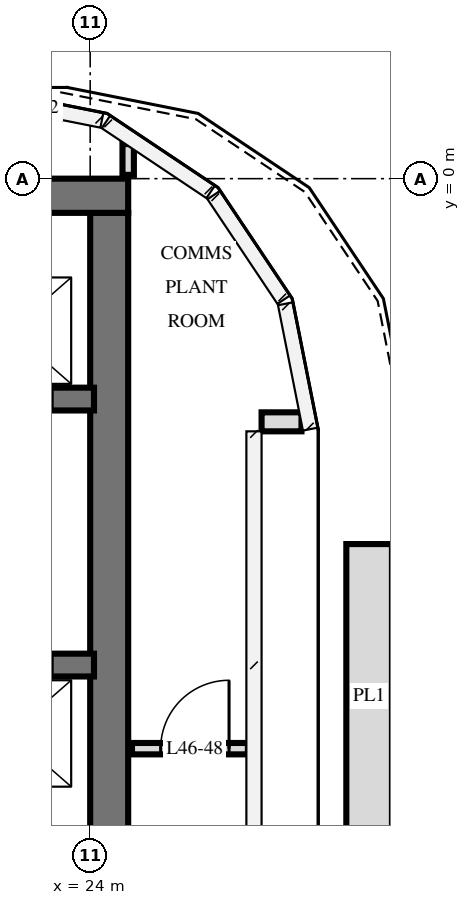
"""IFC4 building model, lengths in metres.
Left out: names, types, materials, properties, quantities, classifications, styles, units other than length and angle.
Written with IfcOpenShell. Run it as: python <this file> out.ifc"""

import sys

from ifc_helpers import new_model, si_unit, direction, frame, frame_2d, origin, place, context, subcontext, project, spatial, rectangle, extrude, element, fill, save


model = new_model("IFC4")
c1 = context("Model", 3, precision=1e-05, world=origin(), true_north=direction((0.0, 1.0)))
c2 = subcontext(c1, "Body", "Model", "MODEL_VIEW")
j1 = project(units=[si_unit("LENGTHUNIT", "METRE"), si_unit("PLANEANGLEUNIT", "RADIAN")], contexts=[c1])
p1 = place(None, origin())
s1 = spatial("IfcSite", under=j1, at=p1, CompositionType="ELEMENT")
p2 = place(p1, origin())
s2 = spatial("IfcBuilding", under=s1, at=p2, CompositionType="ELEMENT")
p3 = place(p2, frame((0.0, 0.0, 177.6)))
s3 = spatial("IfcBuildingStorey", under=s2, at=p3, CompositionType="ELEMENT", Elevation=177.6)
p4 = place(p3, frame((10.0, -0.225, 0.0), z_axis=(0.0, 0.0, 1.0), x_axis=(1.0, 0.0, 0.0)))
e1 = element("IfcWall", 1, at=p4, inside=s3, PredefinedType="SHEAR", context=c2, shape_type="SweptSolid", body=[
    extrude(rectangle(XDim=14.5, YDim=0.45, at=frame_2d((7.25, 0.0))), origin(), (0.0, 0.0, 1.0), 6.0),
])
p5 = place(p3, frame((24.25, -14.55, 0.0), z_axis=(0.0, 0.0, 1.0), x_axis=(0.0, 1.0, 0.0)))
e2 = element("IfcWall", 2, at=p5, inside=s3, PredefinedType="SHEAR", context=c2, shape_type="SweptSolid", body=[
    extrude(rectangle(XDim=14.1, YDim=0.5, at=frame_2d((7.05, 0.0))), origin(), (0.0, 0.0, 1.0), 6.0),
])
p6 = place(p3, frame((10.35, -2.9, 0.0), z_axis=(0.0, 0.0, 1.0), x_axis=(1.0, 0.0, 0.0)))
e3 = element("IfcWall", 3, at=p6, inside=s3, PredefinedType="SHEAR", context=c2, shape_type="SweptSolid", body=[
    extrude(rectangle(XDim=13.7, YDim=0.3, at=frame_2d((6.85, 0.0))), origin(), (0.0, 0.0, 1.0), 6.0),
])
p7 = place(p6, frame((12.05, 0.0, 0.0)))
e4 = element("IfcOpeningElement", 4, at=p7, cuts=e3, PredefinedType="OPENING", context=c2, shape_type="SweptSolid", body=[
    extrude(rectangle(XDim=1.1, YDim=2.1, at=frame_2d((0.55, 1.05))), frame((0.0, 0.16, 0.0), z_axis=(0.0, -1.0, 0.0), x_axis=(1.0, 0.0, 0.0)), (0.0, 0.0, 1.0), 0.32),
])
p8 = place(p6, frame((6.9, 0.0, 0.0)))
e5 = element("IfcOpeningElement", 5, at=p8, cuts=e3, PredefinedType="OPENING", context=c2, shape_type="SweptSolid", body=[
    extrude(rectangle(XDim=0.9, YDim=2.1, at=frame_2d((0.45, 1.05))), frame((0.0, 0.16, 0.0), z_axis=(0.0, -1.0, 0.0), x_axis=(1.0, 0.0, 0.0)), (0.0, 0.0, 1.0), 0.32),
])
p9 = place(p6, frame((0.85, 0.0, 0.0)))
e6 = element("IfcOpeningElement", 6, at=p9, cuts=e3, PredefinedType="OPENING", context=c2, shape_type="SweptSolid", body=[
    extrude(rectangle(XDim=1.0, YDim=2.1, at=frame_2d((0.5, 1.05))), frame((0.0, 0.16, 0.0), z_axis=(0.0, -1.0, 0.0), x_axis=(1.0, 0.0, 0.0)), (0.0, 0.0, 1.0), 0.32),
])
p10 = place(p6, frame((3.387, 0.0, 0.0)))
e7 = element("IfcOpeningElement", 7, at=p10, cuts=e3, PredefinedType="OPENING", context=c2, shape_type="SweptSolid", body=[
    extrude(rectangle(XDim=1.0, YDim=2.1, at=frame_2d((0.5, 1.05))), frame((0.0, 0.16, 0.0), z_axis=(0.0, -1.0, 0.0), x_axis=(1.0, 0.0, 0.0)), (0.0, 0.0, 1.0), 0.32),
])
p11 = place(p6, frame((4.812, 0.0, 0.0)))
e8 = element("IfcOpeningElement", 8, at=p11, cuts=e3, PredefinedType="OPENING", context=c2, shape_type="SweptSolid", body=[
    extrude(rectangle(XDim=1.0, YDim=2.1, at=frame_2d((0.5, 1.05))), frame((0.0, 0.16, 0.0), z_axis=(0.0, -1.0, 0.0), x_axis=(1.0, 0.0, 0.0)), (0.0, 0.0, 1.0), 0.32),
])
p12 = place(p6, frame((9.7, 0.0, 0.0)))
e9 = element("IfcOpeningElement", 9, at=p12, cuts=e3, PredefinedType="OPENING", context=c2, shape_type="SweptSolid", body=[
    extrude(rectangle(XDim=1.0, YDim=2.1, at=frame_2d((0.5, 1.05))), frame((0.0, 0.16, 0.0), z_axis=(0.0, -1.0, 0.0), x_axis=(1.0, 0.0, 0.0)), (0.0, 0.0, 1.0), 0.32),
])
p13 = place(p3, frame((10.35, -6.4, 0.0), z_axis=(0.0, 0.0, 1.0), x_axis=(1.0, 0.0, 0.0)))
e10 = element("IfcWall", 10, at=p13, inside=s3, PredefinedType="SHEAR", context=c2, shape_type="SweptSolid", body=[
    extrude(rectangle(XDim=13.7, YDim=0.3, at=frame_2d((6.85, 0.0))), origin(), (0.0, 0.0, 1.0), 6.0),
])
p14 = place(p13, frame((9.65, 0.0, 0.0)))
e11 = element("IfcOpeningElement", 11, at=p14, cuts=e10, PredefinedType="OPENING", context=c2, shape_type="SweptSolid", body=[
    extrude(rectangle(XDim=1.1, YDim=2.1, at=frame_2d((0.55, 1.05))), frame((0.0, 0.16, 0.0), z_axis=(0.0, -1.0, 0.0), x_axis=(1.0, 0.0, 0.0)), (0.0, 0.0, 1.0), 0.32),
])
p15 = place(p13, frame((12.05, 0.0, 0.0)))
e12 = element("IfcOpeningElement", 12, at=p15, cuts=e10, PredefinedType="OPENING", context=c2, shape_type="SweptSolid", body=[
    extrude(rectangle(XDim=1.1, YDim=2.1, at=frame_2d((0.55, 1.05))), frame((0.0, 0.16, 0.0), z_axis=(0.0, -1.0, 0.0), x_axis=(1.0, 0.0, 0.0)), (0.0, 0.0, 1.0), 0.32),
])
p16 = place(p13, frame((6.8, 0.0, 0.0)))
e13 = element("IfcOpeningElement", 13, at=p16, cuts=e10, PredefinedType="OPENING", context=c2, shape_type="SweptSolid", body=[
    extrude(rectangle(XDim=1.1, YDim=2.1, at=frame_2d((0.55, 1.05))), frame((0.0, 0.16, 0.0), z_axis=(0.0, -1.0, 0.0), x_axis=(1.0, 0.0, 0.0)), (0.0, 0.0, 1.0), 0.32),
])
p17 = place(p3, frame((26.255, -3.2, 0.0), z_axis=(0.0, 0.0, 1.0), x_axis=(1.0, 0.0, 0.0)))
e14 = element("IfcWall", 14, at=p17, inside=s3, PredefinedType="SOLIDWALL", context=c2, shape_type="SweptSolid", body=[
    extrude(rectangle(XDim=0.525, YDim=0.25, at=frame_2d((0.263, 0.0))), origin(), (0.0, 0.0, 1.0), 5.72),
])
p18 = place(p3, frame((27.67, -4.808, 0.0), z_axis=(0.0, 0.0, 1.0), x_axis=(0.0, -1.0, 0.0)))
e15 = element("IfcWall", 15, at=p18, inside=s3, PredefinedType="USERDEFINED", context=c2, shape_type="SweptSolid", body=[
    extrude(rectangle(XDim=4.0, YDim=0.6, at=frame_2d((2.0, 0.0))), origin(), (0.0, 0.0, 1.0), 0.65),
])
p19 = place(p3, frame((24.5, 0.05, 0.0), z_axis=(0.0, 0.0, 1.0), x_axis=(0.0, 1.0, 0.0)))
e16 = element("IfcWall", 16, at=p19, inside=s3, PredefinedType="PARTITIONING", context=c2, shape_type="SweptSolid", body=[
    extrude(rectangle(XDim=0.405, YDim=0.15, at=frame_2d((0.203, 0.0))), origin(), (0.0, 0.0, 1.0), 5.7),
])
p20 = place(p3, frame((24.55, -7.5, 0.0), z_axis=(0.0, 0.0, 1.0), x_axis=(1.0, 0.0, 0.0)))
e17 = element("IfcWall", 17, at=p20, inside=s3, PredefinedType="PARTITIONING", context=c2, shape_type="SweptSolid", body=[
    extrude(rectangle(XDim=1.525, YDim=0.15, at=frame_2d((0.762, 0.0))), origin(), (0.0, 0.0, 1.0), 5.7),
])
p21 = place(p20, frame((0.377, 0.0, 0.0)))
e18 = element("IfcOpeningElement", 18, at=p21, cuts=e17, PredefinedType="OPENING", context=c2, shape_type="SweptSolid", body=[
    extrude(rectangle(XDim=0.9, YDim=2.1, at=frame_2d((0.45, 1.05))), frame((0.0, 0.085, 0.0), z_axis=(0.0, -1.0, 0.0), x_axis=(1.0, 0.0, 0.0)), (0.0, 0.0, 1.0), 0.17),
])
p22 = place(p7, origin())
e19 = element("IfcDoor", 19, at=p22, inside=s3, OperationType="DOUBLE_DOOR_SLIDING", PredefinedType="USERDEFINED", context=c2, shape_type="SweptSolid", body=[
    extrude(rectangle(XDim=1.1, YDim=2.1, at=frame_2d((0.55, 1.05))), frame((0.0, 0.025, 0.0), z_axis=(0.0, -1.0, 0.0), x_axis=(1.0, 0.0, 0.0)), (0.0, 0.0, 1.0), 0.05),
])
fill(e4, e19)
p23 = place(p15, origin())
e20 = element("IfcDoor", 20, at=p23, inside=s3, OperationType="DOUBLE_DOOR_SLIDING", PredefinedType="USERDEFINED", context=c2, shape_type="SweptSolid", body=[
    extrude(rectangle(XDim=1.1, YDim=2.1, at=frame_2d((0.55, 1.05))), frame((0.0, 0.025, 0.0), z_axis=(0.0, -1.0, 0.0), x_axis=(1.0, 0.0, 0.0)), (0.0, 0.0, 1.0), 0.05),
])
fill(e12, e20)
p24 = place(p21, origin())
e21 = element("IfcDoor", 21, at=p24, inside=s3, OperationType="SINGLE_SWING_LEFT", PredefinedType="DOOR", context=c2, shape_type="SweptSolid", body=[
    extrude(rectangle(XDim=0.9, YDim=2.1, at=frame_2d((0.45, 1.05))), frame((0.0, 0.025, 0.0), z_axis=(0.0, -1.0, 0.0), x_axis=(1.0, 0.0, 0.0)), (0.0, 0.0, 1.0), 0.05),
])
fill(e18, e21)
save(model, sys.argv[1])
